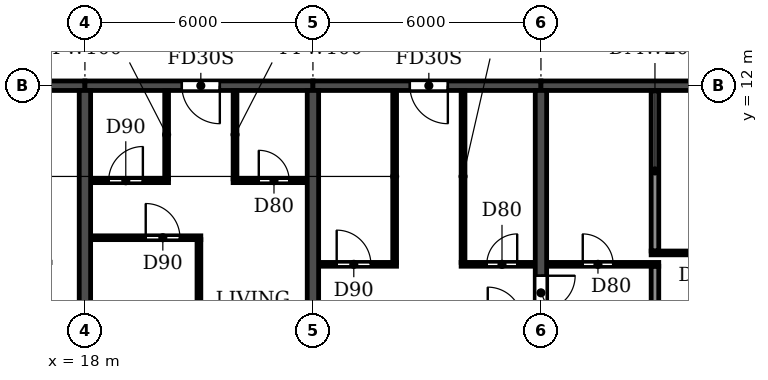
"""IFC4 building model, lengths in metres.
Left out: names, types, materials, properties, quantities, classifications, styles, units other than length and angle.
Written with IfcOpenShell. Run it as: python <this file> out.ifc"""

import sys

from ifc_helpers import new_model, si_unit, direction, frame, frame_2d, origin, place, context, subcontext, project, spatial, rectangle, extrude, element, fill, save


model = new_model("IFC4")
c1 = context("Model", 3, precision=1e-05, world=origin(), true_north=direction((0.0, 1.0)))
c2 = subcontext(c1, "Body", "Model", "MODEL_VIEW")
j1 = project(units=[si_unit("LENGTHUNIT", "METRE"), si_unit("PLANEANGLEUNIT", "RADIAN")], contexts=[c1])
p1 = place(None, origin())
s1 = spatial("IfcSite", under=j1, at=p1, CompositionType="ELEMENT")
p2 = place(p1, origin())
s2 = spatial("IfcBuilding", under=s1, at=p2, CompositionType="ELEMENT")
p3 = place(p2, frame((0.0, 0.0, 155.4)))
s3 = spatial("IfcBuildingStorey", under=s2, at=p3, CompositionType="ELEMENT", Elevation=155.4)
for number, where, z_axis, x_axis in (
    (1, (18.0, 0.2, 0.0), (0.0, 0.0, 1.0), (0.0, 1.0, 0.0)),
    (2, (24.0, 0.2, 0.0), (0.0, 0.0, 1.0), (0.0, 1.0, 0.0)),
):
    element("IfcWall", number, at=place(p3, frame(where, z_axis=z_axis, x_axis=x_axis)), inside=s3, PredefinedType="SHEAR", context=c2, shape_type="SweptSolid", body=[
        extrude(rectangle(XDim=11.675, YDim=0.3, at=frame_2d((5.837, 0.0))), origin(), (0.0, 0.0, 1.0), 3.0),
    ])
p4 = place(p3, frame((30.0, 0.2, 0.0), z_axis=(0.0, 0.0, 1.0), x_axis=(0.0, 1.0, 0.0)))
e3 = element("IfcWall", 3, at=p4, inside=s3, PredefinedType="SHEAR", context=c2, shape_type="SweptSolid", body=[
    extrude(rectangle(XDim=11.675, YDim=0.3, at=frame_2d((5.837, 0.0))), origin(), (0.0, 0.0, 1.0), 3.0),
])
p5 = place(p4, frame((5.9, 0.0, 0.0)))
e4 = element("IfcOpeningElement", 4, at=p5, cuts=e3, PredefinedType="OPENING", context=c2, shape_type="SweptSolid", body=[
    extrude(rectangle(XDim=0.9, YDim=2.1, at=frame_2d((0.45, 1.05))), frame((0.0, 0.16, 0.0), z_axis=(0.0, -1.0, 0.0), x_axis=(1.0, 0.0, 0.0)), (0.0, 0.0, 1.0), 0.32),
])
p6 = place(p3, frame((12.2, 12.0, 0.0), z_axis=(0.0, 0.0, 1.0), x_axis=(1.0, 0.0, 0.0)))
e5 = element("IfcWall", 5, at=p6, inside=s3, PredefinedType="SHEAR", context=c2, shape_type="SweptSolid", body=[
    extrude(rectangle(XDim=5.8, YDim=0.25, at=frame_2d((2.9, 0.0))), origin(), (0.0, 0.0, 1.0), 2.4),
])
p7 = place(p6, frame((2.3, 0.0, 0.0)))
e6 = element("IfcOpeningElement", 6, at=p7, cuts=e5, PredefinedType="OPENING", context=c2, shape_type="SweptSolid", body=[
    extrude(rectangle(XDim=1.0, YDim=2.1, at=frame_2d((0.5, 1.05))), frame((0.0, 0.135, 0.0), z_axis=(0.0, -1.0, 0.0), x_axis=(1.0, 0.0, 0.0)), (0.0, 0.0, 1.0), 0.27),
])
p8 = place(p3, frame((18.0, 12.0, 0.0), z_axis=(0.0, 0.0, 1.0), x_axis=(1.0, 0.0, 0.0)))
e7 = element("IfcWall", 7, at=p8, inside=s3, PredefinedType="SHEAR", context=c2, shape_type="SweptSolid", body=[
    extrude(rectangle(XDim=6.0, YDim=0.25, at=frame_2d((3.0, 0.0))), origin(), (0.0, 0.0, 1.0), 2.4),
])
p9 = place(p8, frame((2.55, 0.0, 0.0)))
e8 = element("IfcOpeningElement", 8, at=p9, cuts=e7, PredefinedType="OPENING", context=c2, shape_type="SweptSolid", body=[
    extrude(rectangle(XDim=1.0, YDim=2.1, at=frame_2d((0.5, 1.05))), frame((0.0, 0.135, 0.0), z_axis=(0.0, -1.0, 0.0), x_axis=(1.0, 0.0, 0.0)), (0.0, 0.0, 1.0), 0.27),
])
p10 = place(p3, frame((24.0, 12.0, 0.0), z_axis=(0.0, 0.0, 1.0), x_axis=(1.0, 0.0, 0.0)))
e9 = element("IfcWall", 9, at=p10, inside=s3, PredefinedType="SHEAR", context=c2, shape_type="SweptSolid", body=[
    extrude(rectangle(XDim=6.0, YDim=0.25, at=frame_2d((3.0, 0.0))), origin(), (0.0, 0.0, 1.0), 2.4),
])
p11 = place(p10, frame((2.55, 0.0, 0.0)))
e10 = element("IfcOpeningElement", 10, at=p11, cuts=e9, PredefinedType="OPENING", context=c2, shape_type="SweptSolid", body=[
    extrude(rectangle(XDim=1.0, YDim=2.1, at=frame_2d((0.5, 1.05))), frame((0.0, 0.135, 0.0), z_axis=(0.0, -1.0, 0.0), x_axis=(1.0, 0.0, 0.0)), (0.0, 0.0, 1.0), 0.27),
])
p12 = place(p3, frame((30.0, 12.0, 0.0), z_axis=(0.0, 0.0, 1.0), x_axis=(1.0, 0.0, 0.0)))
e11 = element("IfcWall", 11, at=p12, inside=s3, PredefinedType="SHEAR", context=c2, shape_type="SweptSolid", body=[
    extrude(rectangle(XDim=6.0, YDim=0.25, at=frame_2d((3.0, 0.0))), origin(), (0.0, 0.0, 1.0), 2.4),
])
p13 = place(p3, frame((33.0, 0.06, 0.0), z_axis=(0.0, 0.0, 1.0), x_axis=(0.0, 1.0, 0.0)))
e12 = element("IfcWall", 12, at=p13, inside=s3, PredefinedType="PARTITIONING", context=c2, shape_type="SweptSolid", body=[
    extrude(rectangle(XDim=7.19, YDim=0.2, at=frame_2d((3.595, 0.0))), origin(), (0.0, 0.0, 1.0), 3.0),
])
p14 = place(p3, frame((33.0, 7.65, 0.0), z_axis=(0.0, 0.0, 1.0), x_axis=(0.0, 1.0, 0.0)))
e13 = element("IfcWall", 13, at=p14, inside=s3, PredefinedType="PARTITIONING", context=c2, shape_type="SweptSolid", body=[
    extrude(rectangle(XDim=4.215, YDim=0.2, at=frame_2d((2.107, 0.0))), origin(), (0.0, 0.0, 1.0), 3.0),
])
p15 = place(p3, frame((24.16, 7.3, 0.0), z_axis=(0.0, 0.0, 1.0), x_axis=(1.0, 0.0, 0.0)))
e14 = element("IfcWall", 14, at=p15, inside=s3, PredefinedType="PARTITIONING", context=c2, shape_type="SweptSolid", body=[
    extrude(rectangle(XDim=2.04, YDim=0.1, at=frame_2d((1.02, 0.0))), origin(), (0.0, 0.0, 1.0), 3.0),
])
p16 = place(p15, frame((0.465, 0.0, 0.0)))
e15 = element("IfcOpeningElement", 15, at=p16, cuts=e14, PredefinedType="OPENING", context=c2, shape_type="SweptSolid", body=[
    extrude(rectangle(XDim=0.9, YDim=2.1, at=frame_2d((0.45, 1.05))), frame((0.0, 0.06, 0.0), z_axis=(0.0, -1.0, 0.0), x_axis=(1.0, 0.0, 0.0)), (0.0, 0.0, 1.0), 0.12),
])
p17 = place(p3, frame((27.9, 7.3, 0.0), z_axis=(0.0, 0.0, 1.0), x_axis=(1.0, 0.0, 0.0)))
e16 = element("IfcWall", 16, at=p17, inside=s3, PredefinedType="PARTITIONING", context=c2, shape_type="SweptSolid", body=[
    extrude(rectangle(XDim=1.94, YDim=0.1, at=frame_2d((0.97, 0.0))), origin(), (0.0, 0.0, 1.0), 3.0),
])
p18 = place(p17, frame((0.675, 0.0, 0.0)))
e17 = element("IfcOpeningElement", 17, at=p18, cuts=e16, PredefinedType="OPENING", context=c2, shape_type="SweptSolid", body=[
    extrude(rectangle(XDim=0.8, YDim=2.1, at=frame_2d((0.4, 1.05))), frame((0.0, 0.06, 0.0), z_axis=(0.0, -1.0, 0.0), x_axis=(1.0, 0.0, 0.0)), (0.0, 0.0, 1.0), 0.12),
])
p19 = place(p3, frame((30.16, 7.3, 0.0), z_axis=(0.0, 0.0, 1.0), x_axis=(1.0, 0.0, 0.0)))
e18 = element("IfcWall", 18, at=p19, inside=s3, PredefinedType="PARTITIONING", context=c2, shape_type="SweptSolid", body=[
    extrude(rectangle(XDim=2.94, YDim=0.1, at=frame_2d((1.47, 0.0))), origin(), (0.0, 0.0, 1.0), 3.0),
])
p20 = place(p19, frame((0.94, 0.0, 0.0)))
e19 = element("IfcOpeningElement", 19, at=p20, cuts=e18, PredefinedType="OPENING", context=c2, shape_type="SweptSolid", body=[
    extrude(rectangle(XDim=0.8, YDim=2.1, at=frame_2d((0.4, 1.05))), frame((0.0, 0.06, 0.0), z_axis=(0.0, -1.0, 0.0), x_axis=(1.0, 0.0, 0.0)), (0.0, 0.0, 1.0), 0.12),
])
p21 = place(p3, frame((32.9, 7.6, 0.0), z_axis=(0.0, 0.0, 1.0), x_axis=(1.0, 0.0, 0.0)))
e20 = element("IfcWall", 20, at=p21, inside=s3, PredefinedType="PARTITIONING", context=c2, shape_type="SweptSolid", body=[
    extrude(rectangle(XDim=2.94, YDim=0.1, at=frame_2d((1.47, 0.0))), origin(), (0.0, 0.0, 1.0), 3.0),
])
p22 = place(p21, frame((1.2, 0.0, 0.0)))
e21 = element("IfcOpeningElement", 21, at=p22, cuts=e20, PredefinedType="OPENING", context=c2, shape_type="SweptSolid", body=[
    extrude(rectangle(XDim=0.8, YDim=2.1, at=frame_2d((0.4, 1.05))), frame((0.0, 0.06, 0.0), z_axis=(0.0, -1.0, 0.0), x_axis=(1.0, 0.0, 0.0)), (0.0, 0.0, 1.0), 0.12),
])
p23 = place(p3, frame((18.16, 8.0, 0.0), z_axis=(0.0, 0.0, 1.0), x_axis=(1.0, 0.0, 0.0)))
e22 = element("IfcWall", 22, at=p23, inside=s3, PredefinedType="PARTITIONING", context=c2, shape_type="SweptSolid", body=[
    extrude(rectangle(XDim=2.89, YDim=0.1, at=frame_2d((1.445, 0.0))), origin(), (0.0, 0.0, 1.0), 3.0),
])
p24 = place(p23, frame((1.44, 0.0, 0.0)))
e23 = element("IfcOpeningElement", 23, at=p24, cuts=e22, PredefinedType="OPENING", context=c2, shape_type="SweptSolid", body=[
    extrude(rectangle(XDim=0.9, YDim=2.1, at=frame_2d((0.45, 1.05))), frame((0.0, 0.06, 0.0), z_axis=(0.0, -1.0, 0.0), x_axis=(1.0, 0.0, 0.0)), (0.0, 0.0, 1.0), 0.12),
])
p25 = place(p3, frame((18.16, 9.5, 0.0), z_axis=(0.0, 0.0, 1.0), x_axis=(1.0, 0.0, 0.0)))
e24 = element("IfcWall", 24, at=p25, inside=s3, PredefinedType="PARTITIONING", context=c2, shape_type="SweptSolid", body=[
    extrude(rectangle(XDim=2.04, YDim=0.1, at=frame_2d((1.02, 0.0))), origin(), (0.0, 0.0, 1.0), 3.0),
])
p26 = place(p25, frame((0.465, 0.0, 0.0)))
e25 = element("IfcOpeningElement", 25, at=p26, cuts=e24, PredefinedType="OPENING", context=c2, shape_type="SweptSolid", body=[
    extrude(rectangle(XDim=0.9, YDim=2.1, at=frame_2d((0.45, 1.05))), frame((0.0, 0.06, 0.0), z_axis=(0.0, -1.0, 0.0), x_axis=(1.0, 0.0, 0.0)), (0.0, 0.0, 1.0), 0.12),
])
p27 = place(p3, frame((21.9, 9.5, 0.0), z_axis=(0.0, 0.0, 1.0), x_axis=(1.0, 0.0, 0.0)))
e26 = element("IfcWall", 26, at=p27, inside=s3, PredefinedType="PARTITIONING", context=c2, shape_type="SweptSolid", body=[
    extrude(rectangle(XDim=1.94, YDim=0.1, at=frame_2d((0.97, 0.0))), origin(), (0.0, 0.0, 1.0), 3.0),
])
p28 = place(p27, frame((0.675, 0.0, 0.0)))
e27 = element("IfcOpeningElement", 27, at=p28, cuts=e26, PredefinedType="OPENING", context=c2, shape_type="SweptSolid", body=[
    extrude(rectangle(XDim=0.8, YDim=2.1, at=frame_2d((0.4, 1.05))), frame((0.0, 0.06, 0.0), z_axis=(0.0, -1.0, 0.0), x_axis=(1.0, 0.0, 0.0)), (0.0, 0.0, 1.0), 0.12),
])
p29 = place(p3, frame((20.15, 9.55, 0.0), z_axis=(0.0, 0.0, 1.0), x_axis=(0.0, 1.0, 0.0)))
e28 = element("IfcWall", 28, at=p29, inside=s3, PredefinedType="PARTITIONING", context=c2, shape_type="SweptSolid", body=[
    extrude(rectangle(XDim=2.315, YDim=0.1, at=frame_2d((1.157, 0.0))), origin(), (0.0, 0.0, 1.0), 3.0),
])
p30 = place(p3, frame((21.0, 0.06, 0.0), z_axis=(0.0, 0.0, 1.0), x_axis=(0.0, 1.0, 0.0)))
e29 = element("IfcWall", 29, at=p30, inside=s3, PredefinedType="PARTITIONING", context=c2, shape_type="SweptSolid", body=[
    extrude(rectangle(XDim=7.89, YDim=0.1, at=frame_2d((3.945, 0.0))), origin(), (0.0, 0.0, 1.0), 3.0),
])
p31 = place(p3, frame((21.95, 9.55, 0.0), z_axis=(0.0, 0.0, 1.0), x_axis=(0.0, 1.0, 0.0)))
e30 = element("IfcWall", 30, at=p31, inside=s3, PredefinedType="PARTITIONING", context=c2, shape_type="SweptSolid", body=[
    extrude(rectangle(XDim=2.315, YDim=0.1, at=frame_2d((1.157, 0.0))), origin(), (0.0, 0.0, 1.0), 3.0),
])
for number, where, z_axis, x_axis in (
    (31, (26.15, 7.35, 0.0), (0.0, 0.0, 1.0), (0.0, 1.0, 0.0)),
    (32, (27.95, 7.35, 0.0), (0.0, 0.0, 1.0), (0.0, 1.0, 0.0)),
):
    element("IfcWall", number, at=place(p3, frame(where, z_axis=z_axis, x_axis=x_axis)), inside=s3, PredefinedType="PARTITIONING", context=c2, shape_type="SweptSolid", body=[
        extrude(rectangle(XDim=4.515, YDim=0.1, at=frame_2d((2.257, 0.0))), origin(), (0.0, 0.0, 1.0), 3.0),
    ])
p32 = place(p26, origin())
e33 = element("IfcDoor", 33, at=p32, inside=s3, OperationType="SINGLE_SWING_RIGHT", PredefinedType="DOOR", context=c2, shape_type="SweptSolid", body=[
    extrude(rectangle(XDim=0.9, YDim=2.1, at=frame_2d((0.45, 1.05))), frame((0.0, 0.025, 0.0), z_axis=(0.0, -1.0, 0.0), x_axis=(1.0, 0.0, 0.0)), (0.0, 0.0, 1.0), 0.05),
])
fill(e25, e33)
p33 = place(p24, origin())
e34 = element("IfcDoor", 34, at=p33, inside=s3, OperationType="SINGLE_SWING_LEFT", PredefinedType="DOOR", context=c2, shape_type="SweptSolid", body=[
    extrude(rectangle(XDim=0.9, YDim=2.1, at=frame_2d((0.45, 1.05))), frame((0.0, 0.025, 0.0), z_axis=(0.0, -1.0, 0.0), x_axis=(1.0, 0.0, 0.0)), (0.0, 0.0, 1.0), 0.05),
])
fill(e23, e34)
p34 = place(p9, frame((1.0, 0.0, 0.0), z_axis=(0.0, 0.0, 1.0), x_axis=(-1.0, 0.0, 0.0)))
e35 = element("IfcDoor", 35, at=p34, inside=s3, OperationType="SINGLE_SWING_LEFT", PredefinedType="DOOR", context=c2, shape_type="SweptSolid", body=[
    extrude(rectangle(XDim=1.0, YDim=2.1, at=frame_2d((0.5, 1.05))), frame((0.0, 0.025, 0.0), z_axis=(0.0, -1.0, 0.0), x_axis=(1.0, 0.0, 0.0)), (0.0, 0.0, 1.0), 0.05),
])
fill(e8, e35)
p35 = place(p28, origin())
e36 = element("IfcDoor", 36, at=p35, inside=s3, OperationType="SINGLE_SWING_LEFT", PredefinedType="DOOR", context=c2, shape_type="SweptSolid", body=[
    extrude(rectangle(XDim=0.8, YDim=2.1, at=frame_2d((0.4, 1.05))), frame((0.0, 0.025, 0.0), z_axis=(0.0, -1.0, 0.0), x_axis=(1.0, 0.0, 0.0)), (0.0, 0.0, 1.0), 0.05),
])
fill(e27, e36)
p36 = place(p20, origin())
e37 = element("IfcDoor", 37, at=p36, inside=s3, OperationType="SINGLE_SWING_LEFT", PredefinedType="DOOR", context=c2, shape_type="SweptSolid", body=[
    extrude(rectangle(XDim=0.8, YDim=2.1, at=frame_2d((0.4, 1.05))), frame((0.0, 0.025, 0.0), z_axis=(0.0, -1.0, 0.0), x_axis=(1.0, 0.0, 0.0)), (0.0, 0.0, 1.0), 0.05),
])
fill(e19, e37)
p37 = place(p16, origin())
e38 = element("IfcDoor", 38, at=p37, inside=s3, OperationType="SINGLE_SWING_LEFT", PredefinedType="DOOR", context=c2, shape_type="SweptSolid", body=[
    extrude(rectangle(XDim=0.9, YDim=2.1, at=frame_2d((0.45, 1.05))), frame((0.0, 0.025, 0.0), z_axis=(0.0, -1.0, 0.0), x_axis=(1.0, 0.0, 0.0)), (0.0, 0.0, 1.0), 0.05),
])
fill(e15, e38)
p38 = place(p11, frame((1.0, 0.0, 0.0), z_axis=(0.0, 0.0, 1.0), x_axis=(-1.0, 0.0, 0.0)))
e39 = element("IfcDoor", 39, at=p38, inside=s3, OperationType="SINGLE_SWING_LEFT", PredefinedType="DOOR", context=c2, shape_type="SweptSolid", body=[
    extrude(rectangle(XDim=1.0, YDim=2.1, at=frame_2d((0.5, 1.05))), frame((0.0, 0.025, 0.0), z_axis=(0.0, -1.0, 0.0), x_axis=(1.0, 0.0, 0.0)), (0.0, 0.0, 1.0), 0.05),
])
fill(e10, e39)
p39 = place(p18, origin())
e40 = element("IfcDoor", 40, at=p39, inside=s3, OperationType="SINGLE_SWING_RIGHT", PredefinedType="DOOR", context=c2, shape_type="SweptSolid", body=[
    extrude(rectangle(XDim=0.8, YDim=2.1, at=frame_2d((0.4, 1.05))), frame((0.0, 0.025, 0.0), z_axis=(0.0, -1.0, 0.0), x_axis=(1.0, 0.0, 0.0)), (0.0, 0.0, 1.0), 0.05),
])
fill(e17, e40)
p40 = place(p5, frame((0.9, 0.0, 0.0), z_axis=(0.0, 0.0, 1.0), x_axis=(-1.0, 0.0, 0.0)))
e41 = element("IfcDoor", 41, at=p40, inside=s3, OperationType="SINGLE_SWING_LEFT", PredefinedType="DOOR", context=c2, shape_type="SweptSolid", body=[
    extrude(rectangle(XDim=0.9, YDim=2.1, at=frame_2d((0.45, 1.05))), frame((0.0, 0.025, 0.0), z_axis=(0.0, -1.0, 0.0), x_axis=(1.0, 0.0, 0.0)), (0.0, 0.0, 1.0), 0.05),
])
fill(e4, e41)
save(model, sys.argv[1])
